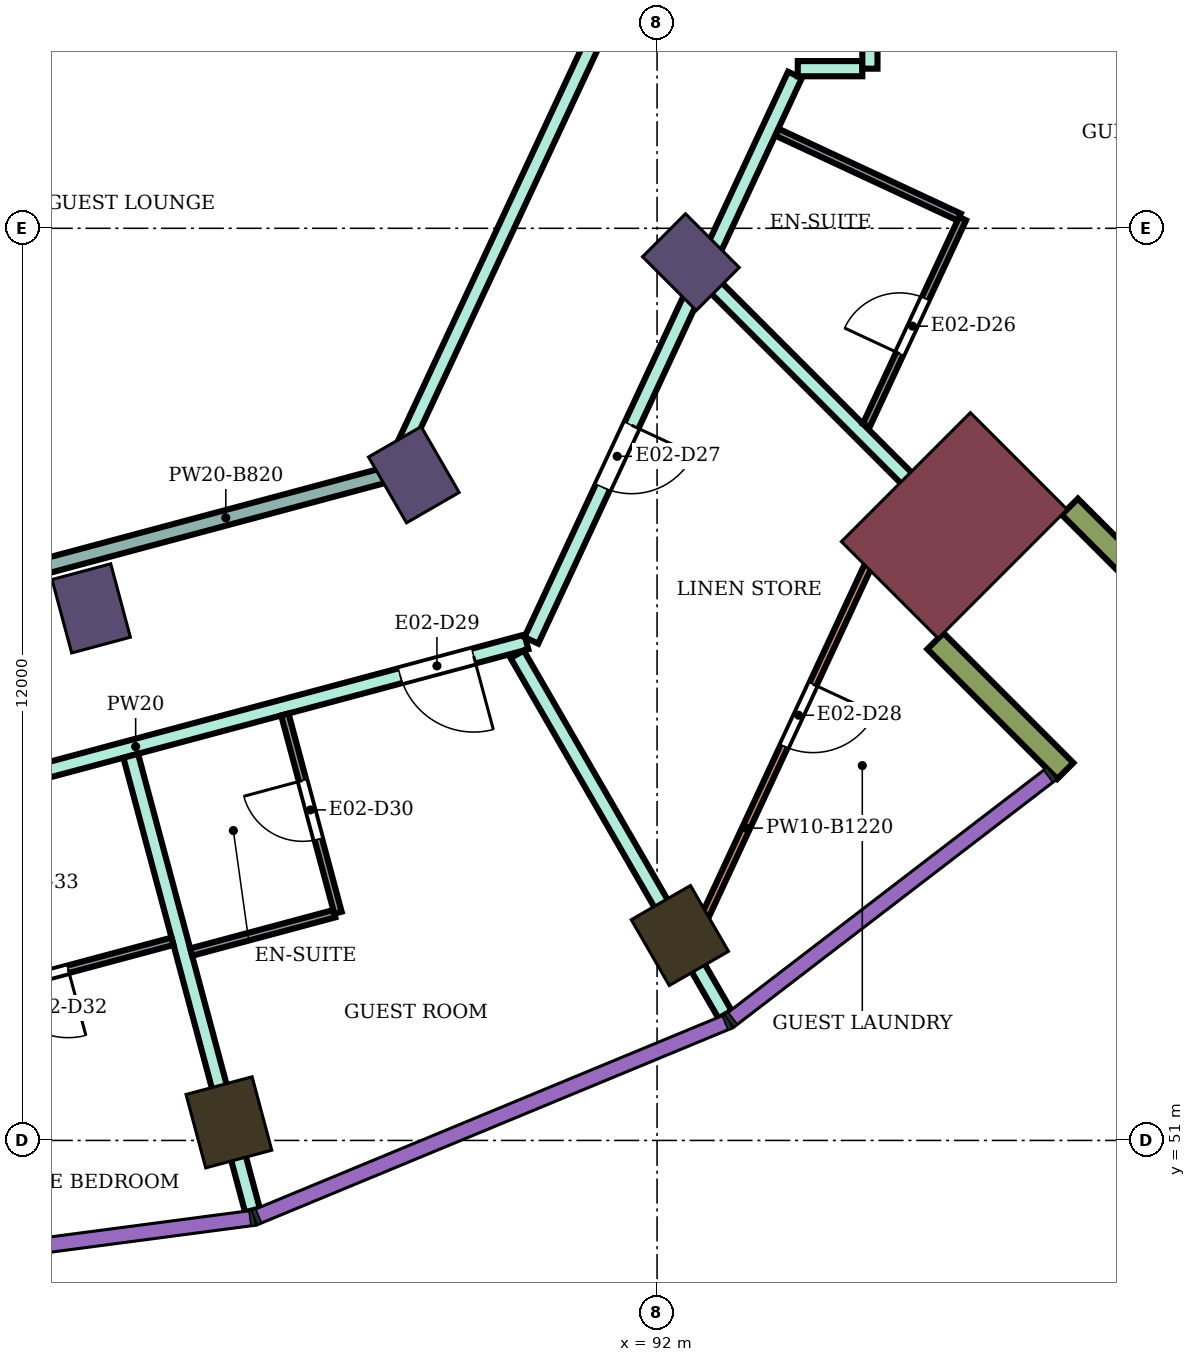
"""IFC4 building model, lengths in metres.
Left out: names, types, materials, properties, quantities, classifications, styles, units other than length and angle.
Written with IfcOpenShell. Run it as: python <this file> out.ifc"""

import sys

from ifc_helpers import new_model, si_unit, direction, frame, frame_2d, origin, origin_2d, place, context, subcontext, project, spatial, rectangle, extrude, element, fill, save


model = new_model("IFC4")
c1 = context("Model", 3, precision=1e-05, world=origin(), true_north=direction((0.0, 1.0)))
c2 = subcontext(c1, "Body", "Model", "MODEL_VIEW")
j1 = project(units=[si_unit("LENGTHUNIT", "METRE"), si_unit("PLANEANGLEUNIT", "RADIAN")], contexts=[c1])
p1 = place(None, origin())
s1 = spatial("IfcSite", under=j1, at=p1, CompositionType="ELEMENT")
p2 = place(p1, origin())
s2 = spatial("IfcBuilding", under=s1, at=p2, CompositionType="ELEMENT")
p3 = place(p2, frame((0.0, 0.0, 130.2)))
s3 = spatial("IfcBuildingStorey", under=s2, at=p3, CompositionType="ELEMENT", Elevation=130.2)
for number, where, z_axis, x_axis in (
    (1, (86.367, 51.238, 0.0), (0.0, 0.0, 1.0), (0.259, -0.966, 0.0)),
    (2, (92.3, 53.696, 0.0), (0.0, 0.0, 1.0), (0.5, -0.866, 0.0)),
):
    element("IfcColumn", number, at=place(p3, frame(where, z_axis=z_axis, x_axis=x_axis)), inside=s3, PredefinedType="COLUMN", context=c2, shape_type="SweptSolid", body=[
        extrude(rectangle(XDim=1.0, YDim=0.9, at=origin_2d()), origin(), (0.0, 0.0, 1.0), 3.9),
    ])
for number, where, z_axis, x_axis in (
    (3, (84.555, 58.0, 0.0), (0.0, 0.0, 1.0), (0.259, -0.966, 0.0)),
    (4, (88.8, 59.758, 0.0), (0.0, 0.0, 1.0), (0.5, -0.866, 0.0)),
    (5, (92.445, 62.555, 0.0), (0.0, 0.0, 1.0), (0.707, -0.707, 0.0)),
):
    element("IfcColumn", number, at=place(p3, frame(where, z_axis=z_axis, x_axis=x_axis)), inside=s3, PredefinedType="COLUMN", context=c2, shape_type="SweptSolid", body=[
        extrude(rectangle(XDim=1.0, YDim=0.8, at=origin_2d()), origin(), (0.0, 0.0, 1.0), 3.9),
    ])
p4 = place(p3, frame((95.91, 59.09, 0.0), z_axis=(0.0, 0.0, 1.0), x_axis=(0.707106781187, -0.707106781187, 0.0)))
e6 = element("IfcColumn", 6, at=p4, inside=s3, PredefinedType="COLUMN", context=c2, shape_type="SweptSolid", body=[
    extrude(rectangle(XDim=1.8, YDim=2.4, at=origin_2d()), origin(), (0.0, 0.0, 1.0), 3.9),
])
for number, where, z_axis, x_axis in (
    (7, (95.662, 57.57, 0.0), (0.0, 0.0, 1.0), (0.707, -0.707, 0.0)),
    (8, (97.43, 59.338, 0.0), (0.0, 0.0, 1.0), (0.707, -0.707, 0.0)),
):
    element("IfcWall", number, at=place(p3, frame(where, z_axis=z_axis, x_axis=x_axis)), inside=s3, PredefinedType="NOTDEFINED", context=c2, shape_type="SweptSolid", body=[
        extrude(rectangle(XDim=2.416, YDim=0.3, at=frame_2d((1.208, 0.0))), origin(), (0.0, 0.0, 1.0), 3.9),
    ])
p5 = place(p3, frame((80.0, 54.805, 0.0), z_axis=(0.0, 0.0, 1.0), x_axis=(0.965967909695, 0.258661936588, 0.0)))
e9 = element("IfcWall", 9, at=p5, inside=s3, PredefinedType="PARTITIONING", context=c2, shape_type="SweptSolid", body=[
    extrude(rectangle(XDim=10.643, YDim=0.2, at=frame_2d((5.322, 0.0))), origin(), (0.0, 0.0, 1.0), 3.45),
])
p6 = place(p5, frame((8.925, 0.0, 0.0)))
e10 = element("IfcOpeningElement", 10, at=p6, cuts=e9, PredefinedType="OPENING", context=c2, shape_type="SweptSolid", body=[
    extrude(rectangle(XDim=1.0, YDim=2.1, at=frame_2d((0.5, 1.05))), frame((0.0, 0.11, 0.0), z_axis=(0.0, -1.0, 0.0), x_axis=(1.0, 0.0, 0.0)), (0.0, 0.0, 1.0), 0.22),
])
p7 = place(p5, frame((2.123, 0.0, 0.0)))
e11 = element("IfcOpeningElement", 11, at=p7, cuts=e9, PredefinedType="OPENING", context=c2, shape_type="SweptSolid", body=[
    extrude(rectangle(XDim=1.0, YDim=2.1, at=frame_2d((0.5, 1.05))), frame((0.0, 0.11, 0.0), z_axis=(0.0, -1.0, 0.0), x_axis=(1.0, 0.0, 0.0)), (0.0, 0.0, 1.0), 0.22),
])
p8 = place(p3, frame((80.001, 57.496, 0.0), z_axis=(0.0, 0.0, 1.0), x_axis=(0.965924211089, 0.258825073035, 0.0)))
e12 = element("IfcWall", 12, at=p8, inside=s3, PredefinedType="PARTITIONING", context=c2, shape_type="SweptSolid", body=[
    extrude(rectangle(XDim=8.731, YDim=0.2, at=frame_2d((4.365, 0.0))), origin(), (0.0, 0.0, 1.0), 3.08),
])
p9 = place(p8, frame((2.3, 0.0, 0.0)))
e13 = element("IfcOpeningElement", 13, at=p9, cuts=e12, PredefinedType="OPENING", context=c2, shape_type="SweptSolid", body=[
    extrude(rectangle(XDim=1.8, YDim=2.1, at=frame_2d((0.9, 1.05))), frame((0.0, 0.11, 0.0), z_axis=(0.0, -1.0, 0.0), x_axis=(1.0, 0.0, 0.0)), (0.0, 0.0, 1.0), 0.22),
])
p10 = place(p3, frame((85.075, 56.061, 0.0), z_axis=(0.0, 0.0, 1.0), x_axis=(0.258703231129, -0.965956851109, 0.0)))
e14 = element("IfcWall", 14, at=p10, inside=s3, PredefinedType="PARTITIONING", context=c2, shape_type="SweptSolid", body=[
    extrude(rectangle(XDim=6.191, YDim=0.2, at=frame_2d((3.095, 0.0))), origin(), (0.0, 0.0, 1.0), 3.45),
])
p11 = place(p3, frame((88.502, 59.774, 0.0), z_axis=(0.0, 0.0, 1.0), x_axis=(0.423423307095, 0.905931952747, 0.0)))
e15 = element("IfcWall", 15, at=p11, inside=s3, PredefinedType="PARTITIONING", context=c2, shape_type="SweptSolid", body=[
    extrude(rectangle(XDim=7.529, YDim=0.2, at=frame_2d((3.764, 0.0))), origin(), (0.0, 0.0, 1.0), 3.45),
])
p12 = place(p3, frame((90.16, 57.396, 0.0), z_axis=(0.0, 0.0, 1.0), x_axis=(0.499848624781, -0.86611278267, 0.0)))
e16 = element("IfcWall", 16, at=p12, inside=s3, PredefinedType="PARTITIONING", context=c2, shape_type="SweptSolid", body=[
    extrude(rectangle(XDim=5.472, YDim=0.2, at=frame_2d((2.736, 0.0))), origin(), (0.0, 0.0, 1.0), 3.45),
])
p13 = place(p3, frame((90.346, 57.578, 0.0), z_axis=(0.0, 0.0, 1.0), x_axis=(0.422476720533, 0.906373775331, 0.0)))
e17 = element("IfcWall", 17, at=p13, inside=s3, PredefinedType="PARTITIONING", context=c2, shape_type="SweptSolid", body=[
    extrude(rectangle(XDim=8.208, YDim=0.2, at=frame_2d((4.104, 0.0))), origin(), (0.0, 0.0, 1.0), 3.45),
])
p14 = place(p13, frame((2.223, 0.0, 0.0)))
e18 = element("IfcOpeningElement", 18, at=p14, cuts=e17, PredefinedType="OPENING", context=c2, shape_type="SweptSolid", body=[
    extrude(rectangle(XDim=0.9, YDim=2.1, at=frame_2d((0.45, 1.05))), frame((0.0, 0.11, 0.0), z_axis=(0.0, -1.0, 0.0), x_axis=(1.0, 0.0, 0.0)), (0.0, 0.0, 1.0), 0.22),
])
p15 = place(p3, frame((92.692, 62.303, 0.0), z_axis=(0.0, 0.0, 1.0), x_axis=(0.706943936447, -0.707269588432, 0.0)))
e19 = element("IfcWall", 19, at=p15, inside=s3, PredefinedType="PARTITIONING", context=c2, shape_type="SweptSolid", body=[
    extrude(rectangle(XDim=5.248, YDim=0.2, at=frame_2d((2.624, 0.0))), origin(), (0.0, 0.0, 1.0), 3.45),
])
p16 = place(p3, frame((93.851, 65.1, 0.0), z_axis=(0.0, 0.0, 1.0), x_axis=(1.0, 0.0, 0.0)))
e20 = element("IfcWall", 20, at=p16, inside=s3, PredefinedType="PARTITIONING", context=c2, shape_type="SweptSolid", body=[
    extrude(rectangle(XDim=0.849, YDim=0.2, at=frame_2d((0.424, 0.0))), origin(), (0.0, 0.0, 1.0), 3.45),
])
p17 = place(p3, frame((94.8, 65.1, 0.0), z_axis=(0.0, 0.0, 1.0), x_axis=(0.0, 1.0, 0.0)))
e21 = element("IfcWall", 21, at=p17, inside=s3, PredefinedType="PARTITIONING", context=c2, shape_type="SweptSolid", body=[
    extrude(rectangle(XDim=1.499, YDim=0.2, at=frame_2d((0.75, 0.0))), origin(), (0.0, 0.0, 1.0), 3.45),
])
p18 = place(p17, frame((0.25, 0.0, 0.0)))
e22 = element("IfcOpeningElement", 22, at=p18, cuts=e21, PredefinedType="OPENING", context=c2, shape_type="SweptSolid", body=[
    extrude(rectangle(XDim=1.0, YDim=2.1, at=frame_2d((0.5, 1.05))), frame((0.0, 0.11, 0.0), z_axis=(0.0, -1.0, 0.0), x_axis=(1.0, 0.0, 0.0)), (0.0, 0.0, 1.0), 0.22),
])
p19 = place(p3, frame((80.106, 52.14, 0.0), z_axis=(0.0, 0.0, 1.0), x_axis=(0.965888724411, 0.25895747152, 0.0)))
e23 = element("IfcWall", 23, at=p19, inside=s3, PredefinedType="PARTITIONING", context=c2, shape_type="SweptSolid", body=[
    extrude(rectangle(XDim=5.714, YDim=0.1, at=frame_2d((2.857, 0.0))), origin(), (0.0, 0.0, 1.0), 3.45),
])
p20 = place(p19, frame((3.392, 0.0, 0.0)))
e24 = element("IfcOpeningElement", 24, at=p20, cuts=e23, PredefinedType="OPENING", context=c2, shape_type="SweptSolid", body=[
    extrude(rectangle(XDim=0.9, YDim=2.1, at=frame_2d((0.45, 1.05))), frame((0.0, 0.06, 0.0), z_axis=(0.0, -1.0, 0.0), x_axis=(1.0, 0.0, 0.0)), (0.0, 0.0, 1.0), 0.12),
])
p21 = place(p3, frame((85.871, 53.478, 0.0), z_axis=(0.0, 0.0, 1.0), x_axis=(0.965853538138, 0.25908867761, 0.0)))
e25 = element("IfcWall", 25, at=p21, inside=s3, PredefinedType="PARTITIONING", context=c2, shape_type="SweptSolid", body=[
    extrude(rectangle(XDim=1.95, YDim=0.1, at=frame_2d((0.975, 0.0))), origin(), (0.0, 0.0, 1.0), 3.45),
])
p22 = place(p3, frame((87.103, 56.604, 0.0), z_axis=(0.0, 0.0, 1.0), x_axis=(0.258883730688, -0.965908491517, 0.0)))
e26 = element("IfcWall", 26, at=p22, inside=s3, PredefinedType="PARTITIONING", context=c2, shape_type="SweptSolid", body=[
    extrude(rectangle(XDim=2.7, YDim=0.1, at=frame_2d((1.35, 0.0))), origin(), (0.0, 0.0, 1.0), 3.45),
])
p23 = place(p22, frame((0.9, 0.0, 0.0)))
e27 = element("IfcOpeningElement", 27, at=p23, cuts=e26, PredefinedType="OPENING", context=c2, shape_type="SweptSolid", body=[
    extrude(rectangle(XDim=0.8, YDim=2.1, at=frame_2d((0.4, 1.05))), frame((0.0, 0.06, 0.0), z_axis=(0.0, -1.0, 0.0), x_axis=(1.0, 0.0, 0.0)), (0.0, 0.0, 1.0), 0.12),
])
p24 = place(p3, frame((92.477, 53.619, 0.0), z_axis=(0.0, 0.0, 1.0), x_axis=(0.421913254756, 0.90663620348, 0.0)))
e28 = element("IfcWall", 28, at=p24, inside=s3, PredefinedType="PARTITIONING", context=c2, shape_type="SweptSolid", body=[
    extrude(rectangle(XDim=6.573, YDim=0.1, at=frame_2d((3.287, 0.0))), origin(), (0.0, 0.0, 1.0), 2.68),
])
p25 = place(p24, frame((2.831, 0.0, 0.0)))
e29 = element("IfcOpeningElement", 29, at=p25, cuts=e28, PredefinedType="OPENING", context=c2, shape_type="SweptSolid", body=[
    extrude(rectangle(XDim=0.9, YDim=2.1, at=frame_2d((0.45, 1.05))), frame((0.0, 0.06, 0.0), z_axis=(0.0, -1.0, 0.0), x_axis=(1.0, 0.0, 0.0)), (0.0, 0.0, 1.0), 0.12),
])
p26 = place(p3, frame((93.582, 64.263, 0.0), z_axis=(0.0, 0.0, 1.0), x_axis=(0.906494794209, -0.422216991691, 0.0)))
e30 = element("IfcWall", 30, at=p26, inside=s3, PredefinedType="PARTITIONING", context=c2, shape_type="SweptSolid", body=[
    extrude(rectangle(XDim=2.64, YDim=0.1, at=frame_2d((1.32, 0.0))), origin(), (0.0, 0.0, 1.0), 3.45),
])
p27 = place(p3, frame((94.753, 60.408, 0.0), z_axis=(0.0, 0.0, 1.0), x_axis=(0.422435455794, 0.906393008406, 0.0)))
e31 = element("IfcWall", 31, at=p27, inside=s3, PredefinedType="PARTITIONING", context=c2, shape_type="SweptSolid", body=[
    extrude(rectangle(XDim=3.0, YDim=0.1, at=frame_2d((1.5, 0.0))), origin(), (0.0, 0.0, 1.0), 3.45),
])
p28 = place(p27, frame((1.04, 0.0, 0.0)))
e32 = element("IfcOpeningElement", 32, at=p28, cuts=e31, PredefinedType="OPENING", context=c2, shape_type="SweptSolid", body=[
    extrude(rectangle(XDim=0.8, YDim=2.1, at=frame_2d((0.4, 1.05))), frame((0.0, 0.06, 0.0), z_axis=(0.0, -1.0, 0.0), x_axis=(1.0, 0.0, 0.0)), (0.0, 0.0, 1.0), 0.12),
])
p29 = place(p28, origin())
e33 = element("IfcDoor", 33, at=p29, inside=s3, OperationType="SINGLE_SWING_LEFT", PredefinedType="DOOR", context=c2, shape_type="SweptSolid", body=[
    extrude(rectangle(XDim=0.8, YDim=2.1, at=frame_2d((0.4, 1.05))), frame((0.0, 0.025, 0.0), z_axis=(0.0, -1.0, 0.0), x_axis=(1.0, 0.0, 0.0)), (0.0, 0.0, 1.0), 0.05),
])
fill(e32, e33)
p30 = place(p14, frame((0.9, 0.0, 0.0), z_axis=(0.0, 0.0, 1.0), x_axis=(-1.0, 0.0, 0.0)))
e34 = element("IfcDoor", 34, at=p30, inside=s3, OperationType="SINGLE_SWING_LEFT", PredefinedType="DOOR", context=c2, shape_type="SweptSolid", body=[
    extrude(rectangle(XDim=0.9, YDim=2.1, at=frame_2d((0.45, 1.05))), frame((0.0, 0.025, 0.0), z_axis=(0.0, -1.0, 0.0), x_axis=(1.0, 0.0, 0.0)), (0.0, 0.0, 1.0), 0.05),
])
fill(e18, e34)
p31 = place(p25, frame((0.9, 0.0, 0.0), z_axis=(0.0, 0.0, 1.0), x_axis=(-1.0, 0.0, 0.0)))
e35 = element("IfcDoor", 35, at=p31, inside=s3, OperationType="SINGLE_SWING_LEFT", PredefinedType="DOOR", context=c2, shape_type="SweptSolid", body=[
    extrude(rectangle(XDim=0.9, YDim=2.1, at=frame_2d((0.45, 1.05))), frame((0.0, 0.025, 0.0), z_axis=(0.0, -1.0, 0.0), x_axis=(1.0, 0.0, 0.0)), (0.0, 0.0, 1.0), 0.05),
])
fill(e29, e35)
p32 = place(p6, frame((1.0, 0.0, 0.0), z_axis=(0.0, 0.0, 1.0), x_axis=(-1.0, 0.0, 0.0)))
e36 = element("IfcDoor", 36, at=p32, inside=s3, OperationType="SINGLE_SWING_LEFT", PredefinedType="DOOR", context=c2, shape_type="SweptSolid", body=[
    extrude(rectangle(XDim=1.0, YDim=2.1, at=frame_2d((0.5, 1.05))), frame((0.0, 0.025, 0.0), z_axis=(0.0, -1.0, 0.0), x_axis=(1.0, 0.0, 0.0)), (0.0, 0.0, 1.0), 0.05),
])
fill(e10, e36)
p33 = place(p23, frame((0.8, 0.0, 0.0), z_axis=(0.0, 0.0, 1.0), x_axis=(-1.0, 0.0, 0.0)))
e37 = element("IfcDoor", 37, at=p33, inside=s3, OperationType="SINGLE_SWING_RIGHT", PredefinedType="DOOR", context=c2, shape_type="SweptSolid", body=[
    extrude(rectangle(XDim=0.8, YDim=2.1, at=frame_2d((0.4, 1.05))), frame((0.0, 0.025, 0.0), z_axis=(0.0, -1.0, 0.0), x_axis=(1.0, 0.0, 0.0)), (0.0, 0.0, 1.0), 0.05),
])
fill(e27, e37)
p34 = place(p20, frame((0.9, 0.0, 0.0), z_axis=(0.0, 0.0, 1.0), x_axis=(-1.0, 0.0, 0.0)))
e38 = element("IfcDoor", 38, at=p34, inside=s3, OperationType="SINGLE_SWING_LEFT", PredefinedType="DOOR", context=c2, shape_type="SweptSolid", body=[
    extrude(rectangle(XDim=0.9, YDim=2.1, at=frame_2d((0.45, 1.05))), frame((0.0, 0.025, 0.0), z_axis=(0.0, -1.0, 0.0), x_axis=(1.0, 0.0, 0.0)), (0.0, 0.0, 1.0), 0.05),
])
fill(e24, e38)
save(model, sys.argv[1])
